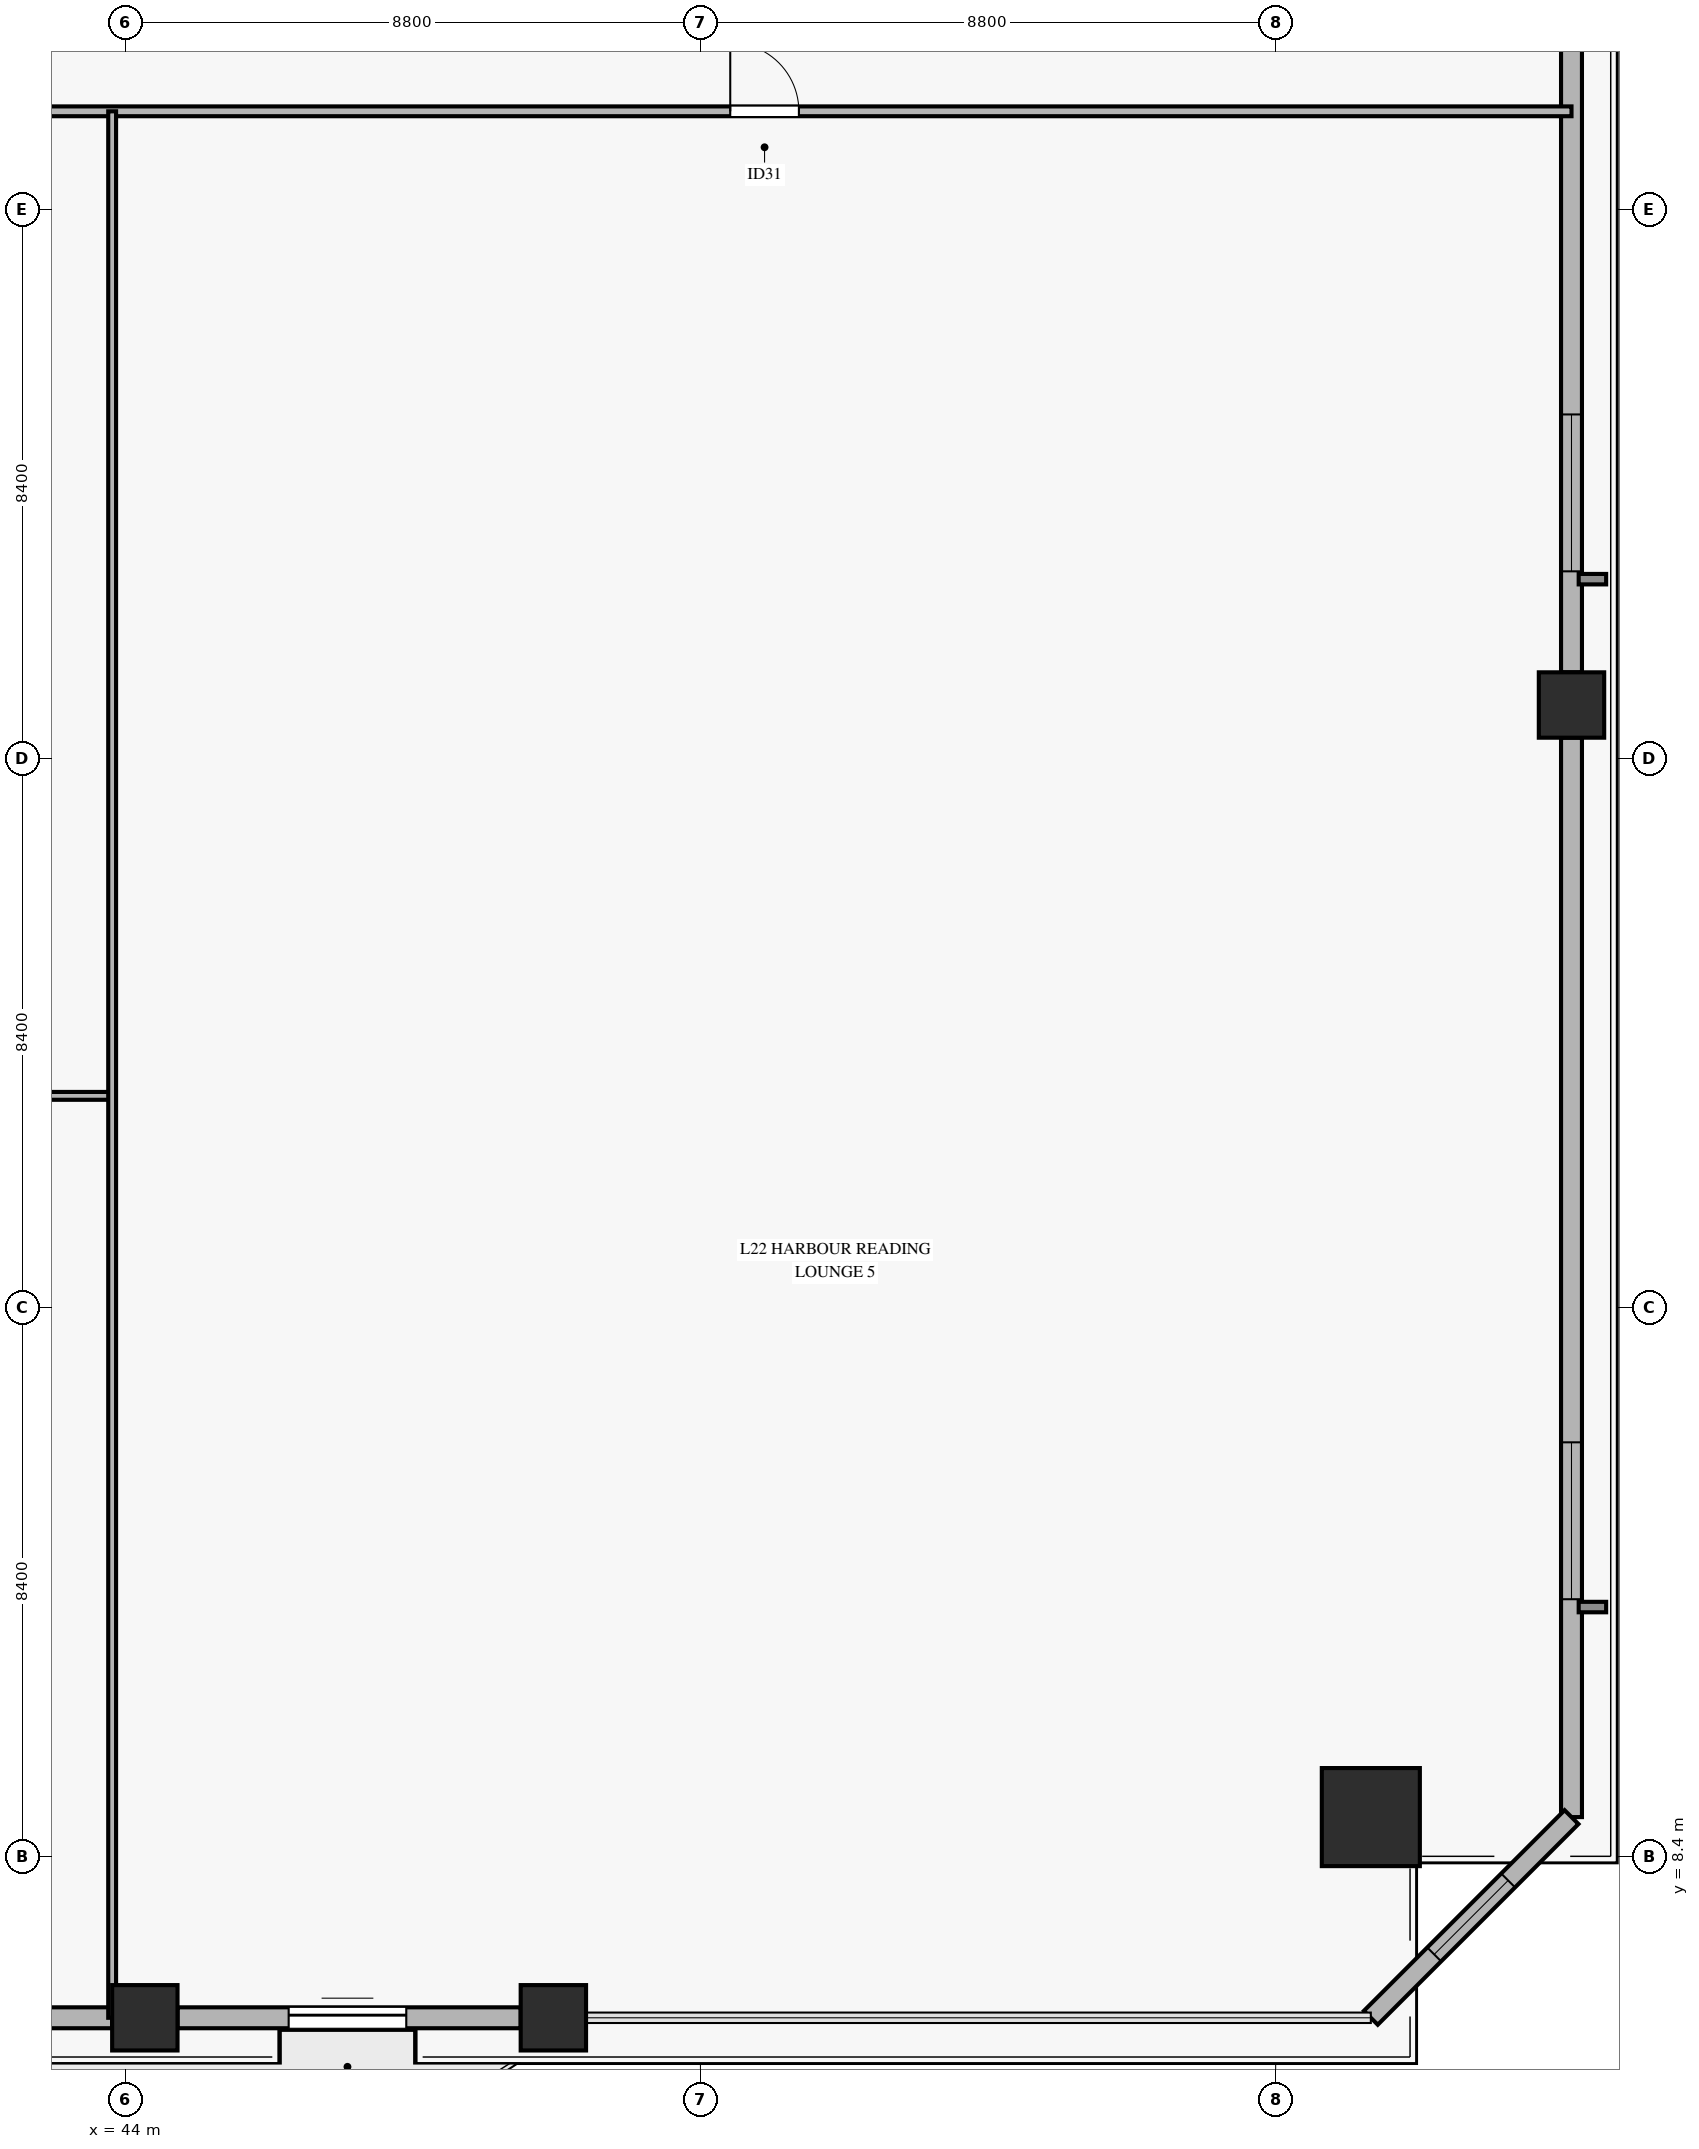
"""IFC4 building model, lengths in metres.
Left out: names, types, materials, properties, quantities, classifications, styles, units other than length and angle.
Written with IfcOpenShell. Run it as: python <this file> out.ifc"""

import sys

from ifc_helpers import new_model, si_unit, direction, frame, frame_2d, origin, origin_2d, place, context, subcontext, project, spatial, rectangle, hollow_rectangle, extrude, source, transform, mapped, element, fill, save


model = new_model("IFC4")
c1 = context("Model", 3, precision=1e-05, world=origin(), true_north=direction((0.0, 1.0)))
c2 = subcontext(c1, "Body", "Model", "MODEL_VIEW")
j1 = project(units=[si_unit("LENGTHUNIT", "METRE"), si_unit("PLANEANGLEUNIT", "RADIAN")], contexts=[c1])
p1 = place(None, origin())
s1 = spatial("IfcSite", under=j1, at=p1, CompositionType="ELEMENT")
p2 = place(p1, origin())
s2 = spatial("IfcBuilding", under=s1, at=p2, CompositionType="ELEMENT")
p3 = place(p2, frame((0.0, 0.0, 91.3)))
s3 = spatial("IfcBuildingStorey", under=s2, at=p3, CompositionType="ELEMENT", Elevation=91.3)
m1 = source(origin(), c2, "Body", "SweptSolid", [
    extrude(hollow_rectangle(XDim=1.5, YDim=1.5, WallThickness=0.07, at=origin_2d()), origin(), (0.0, 0.0, 1.0), 3.62),
])
p4 = place(p3, frame((63.056, 9.006, 0.0), z_axis=(0.0, 0.0, 1.0), x_axis=(1.0, 0.0, 0.0)))
e1 = element("IfcColumn", 1, at=p4, inside=s3, PredefinedType="COLUMN", context=c2, shape_type="MappedRepresentation", body=[
    mapped(m1, transform((0.0, 0.0, 0.0), x_axis=(1.0, 0.0, 0.0), y_axis=(0.0, 1.0, 0.0), z_axis=(0.0, 0.0, 1.0), scale=1.0)),
])
m2 = source(origin(), c2, "Body", "SweptSolid", [
    extrude(hollow_rectangle(XDim=1.0, YDim=1.0, WallThickness=0.045, at=origin_2d()), origin(), (0.0, 0.0, 1.0), 3.62),
])
for number, where, z_axis, x_axis in (
    (2, (44.3, 5.936, 0.0), (0.0, 0.0, 1.0), (1.0, 0.0, 0.0)),
    (3, (50.55, 5.936, 0.0), (0.0, 0.0, 1.0), (1.0, 0.0, 0.0)),
    (4, (66.126, 26.018, 0.0), (0.0, 0.0, 1.0), (1.0, 0.0, 0.0)),
):
    element("IfcColumn", number, at=place(p3, frame(where, z_axis=z_axis, x_axis=x_axis)), inside=s3, PredefinedType="COLUMN", context=c2, shape_type="MappedRepresentation", body=[
        mapped(m2, transform((0.0, 0.0, 0.0), x_axis=(1.0, 0.0, 0.0), y_axis=(0.0, 1.0, 0.0), z_axis=(0.0, 0.0, 1.0), scale=1.0)),
    ])
p5 = place(p3, frame((38.05, 5.936, 0.0), z_axis=(0.0, 0.0, 1.0), x_axis=(1.0, 0.0, 0.0)))
e5 = element("IfcWall", 5, at=p5, inside=s3, PredefinedType="SOLIDWALL", context=c2, shape_type="SweptSolid", body=[
    extrude(rectangle(XDim=5.75, YDim=0.32, at=frame_2d((2.875, 0.0))), origin(), (0.0, 0.0, 1.0), 3.1),
])
p6 = place(p3, frame((44.8, 5.936, 0.0), z_axis=(0.0, 0.0, 1.0), x_axis=(1.0, 0.0, 0.0)))
e6 = element("IfcWall", 6, at=p6, inside=s3, PredefinedType="SOLIDWALL", context=c2, shape_type="SweptSolid", body=[
    extrude(rectangle(XDim=5.25, YDim=0.32, at=frame_2d((2.625, 0.0))), origin(), (0.0, 0.0, 1.0), 3.1),
])
p7 = place(p6, frame((1.7, 0.0, 0.0)))
e7 = element("IfcOpeningElement", 7, at=p7, cuts=e6, PredefinedType="OPENING", context=c2, shape_type="SweptSolid", body=[
    extrude(rectangle(XDim=1.8, YDim=2.25, at=frame_2d((0.9, 1.125))), frame((0.0, 0.17, 0.0), z_axis=(0.0, -1.0, 0.0), x_axis=(1.0, 0.0, 0.0)), (0.0, 0.0, 1.0), 0.34),
])
p8 = place(p3, frame((66.126, 9.006, 0.0), z_axis=(0.0, 0.0, 1.0), x_axis=(0.0, 1.0, 0.0)))
e8 = element("IfcWall", 8, at=p8, inside=s3, PredefinedType="SOLIDWALL", context=c2, shape_type="SweptSolid", body=[
    extrude(rectangle(XDim=16.512, YDim=0.32, at=frame_2d((8.256, 0.0))), origin(), (0.0, 0.0, 1.0), 3.1),
])
p9 = place(p8, frame((3.333, 0.0, 0.45)))
e9 = element("IfcOpeningElement", 9, at=p9, cuts=e8, PredefinedType="OPENING", context=c2, shape_type="SweptSolid", body=[
    extrude(rectangle(XDim=2.4, YDim=2.1, at=frame_2d((1.2, 1.05))), frame((0.0, 0.17, 0.0), z_axis=(0.0, -1.0, 0.0), x_axis=(1.0, 0.0, 0.0)), (0.0, 0.0, 1.0), 0.34),
])
p10 = place(p3, frame((66.126, 26.518, 0.0), z_axis=(0.0, 0.0, 1.0), x_axis=(0.0, 1.0, 0.0)))
e10 = element("IfcWall", 10, at=p10, inside=s3, PredefinedType="SOLIDWALL", context=c2, shape_type="SweptSolid", body=[
    extrude(rectangle(XDim=16.512, YDim=0.32, at=frame_2d((8.256, 0.0))), origin(), (0.0, 0.0, 1.0), 3.1),
])
p11 = place(p10, frame((1.545, 0.0, 0.45)))
e11 = element("IfcOpeningElement", 11, at=p11, cuts=e10, PredefinedType="OPENING", context=c2, shape_type="SweptSolid", body=[
    extrude(rectangle(XDim=2.4, YDim=2.1, at=frame_2d((1.2, 1.05))), frame((0.0, 0.17, 0.0), z_axis=(0.0, -1.0, 0.0), x_axis=(1.0, 0.0, 0.0)), (0.0, 0.0, 1.0), 0.34),
])
p12 = place(p10, frame((12.856, 0.0, 0.45)))
e12 = element("IfcOpeningElement", 12, at=p12, cuts=e10, PredefinedType="OPENING", context=c2, shape_type="SweptSolid", body=[
    extrude(rectangle(XDim=2.4, YDim=2.1, at=frame_2d((1.2, 1.05))), frame((0.0, 0.17, 0.0), z_axis=(0.0, -1.0, 0.0), x_axis=(1.0, 0.0, 0.0)), (0.0, 0.0, 1.0), 0.34),
])
p13 = place(p3, frame((63.056, 5.936, 0.0), z_axis=(0.0, 0.0, 1.0), x_axis=(0.707106781187, 0.707106781187, 0.0)))
e13 = element("IfcWall", 13, at=p13, inside=s3, PredefinedType="SOLIDWALL", context=c2, shape_type="SweptSolid", body=[
    extrude(rectangle(XDim=4.342, YDim=0.3, at=frame_2d((2.171, 0.0))), origin(), (0.0, 0.0, 1.0), 3.1),
])
p14 = place(p13, frame((1.371, 0.0, 0.45)))
e14 = element("IfcOpeningElement", 14, at=p14, cuts=e13, PredefinedType="OPENING", context=c2, shape_type="SweptSolid", body=[
    extrude(rectangle(XDim=1.6, YDim=2.0, at=frame_2d((0.8, 1.0))), frame((0.0, 0.16, 0.0), z_axis=(0.0, -1.0, 0.0), x_axis=(1.0, 0.0, 0.0)), (0.0, 0.0, 1.0), 0.32),
])
p15 = place(p3, frame((4.275, 35.1, 0.0), z_axis=(0.0, 0.0, 1.0), x_axis=(1.0, 0.0, 0.0)))
e15 = element("IfcWall", 15, at=p15, inside=s3, PredefinedType="PARTITIONING", context=c2, shape_type="SweptSolid", body=[
    extrude(rectangle(XDim=61.851, YDim=0.15, at=frame_2d((30.926, 0.0))), origin(), (0.0, 0.0, 1.0), 2.705),
])
p16 = place(p15, frame((8.227, 0.0, 0.0)))
e16 = element("IfcOpeningElement", 16, at=p16, cuts=e15, PredefinedType="OPENING", context=c2, shape_type="SweptSolid", body=[
    extrude(rectangle(XDim=1.05, YDim=2.15, at=frame_2d((0.525, 1.075))), frame((0.0, 0.085, 0.0), z_axis=(0.0, -1.0, 0.0), x_axis=(1.0, 0.0, 0.0)), (0.0, 0.0, 1.0), 0.17),
])
p17 = place(p15, frame((21.731, 0.0, 0.0)))
e17 = element("IfcOpeningElement", 17, at=p17, cuts=e15, PredefinedType="OPENING", context=c2, shape_type="SweptSolid", body=[
    extrude(rectangle(XDim=1.05, YDim=2.15, at=frame_2d((0.525, 1.075))), frame((0.0, 0.085, 0.0), z_axis=(0.0, -1.0, 0.0), x_axis=(1.0, 0.0, 0.0)), (0.0, 0.0, 1.0), 0.17),
])
p18 = place(p15, frame((28.411, 0.0, 0.0)))
e18 = element("IfcOpeningElement", 18, at=p18, cuts=e15, PredefinedType="OPENING", context=c2, shape_type="SweptSolid", body=[
    extrude(rectangle(XDim=1.05, YDim=2.15, at=frame_2d((0.525, 1.075))), frame((0.0, 0.085, 0.0), z_axis=(0.0, -1.0, 0.0), x_axis=(1.0, 0.0, 0.0)), (0.0, 0.0, 1.0), 0.17),
])
p19 = place(p15, frame((35.371, 0.0, 0.0)))
e19 = element("IfcOpeningElement", 19, at=p19, cuts=e15, PredefinedType="OPENING", context=c2, shape_type="SweptSolid", body=[
    extrude(rectangle(XDim=1.05, YDim=2.15, at=frame_2d((0.525, 1.075))), frame((0.0, 0.085, 0.0), z_axis=(0.0, -1.0, 0.0), x_axis=(1.0, 0.0, 0.0)), (0.0, 0.0, 1.0), 0.17),
])
p20 = place(p15, frame((48.981, 0.0, 0.0)))
e20 = element("IfcOpeningElement", 20, at=p20, cuts=e15, PredefinedType="OPENING", context=c2, shape_type="SweptSolid", body=[
    extrude(rectangle(XDim=1.05, YDim=2.15, at=frame_2d((0.525, 1.075))), frame((0.0, 0.085, 0.0), z_axis=(0.0, -1.0, 0.0), x_axis=(1.0, 0.0, 0.0)), (0.0, 0.0, 1.0), 0.17),
])
p21 = place(p3, frame((36.6, 20.039, 0.0), z_axis=(0.0, 0.0, 1.0), x_axis=(1.0, 0.0, 0.0)))
e21 = element("IfcWall", 21, at=p21, inside=s3, PredefinedType="PARTITIONING", context=c2, shape_type="SweptSolid", body=[
    extrude(rectangle(XDim=7.2, YDim=0.12, at=frame_2d((3.6, 0.0))), origin(), (0.0, 0.0, 1.0), 2.705),
])
p22 = place(p21, frame((3.187, 0.0, 0.0)))
e22 = element("IfcOpeningElement", 22, at=p22, cuts=e21, PredefinedType="OPENING", context=c2, shape_type="SweptSolid", body=[
    extrude(rectangle(XDim=0.95, YDim=2.1, at=frame_2d((0.475, 1.05))), frame((0.0, 0.07, 0.0), z_axis=(0.0, -1.0, 0.0), x_axis=(1.0, 0.0, 0.0)), (0.0, 0.0, 1.0), 0.14),
])
p23 = place(p3, frame((43.8, 5.936, 0.0), z_axis=(0.0, 0.0, 1.0), x_axis=(0.0, 1.0, 0.0)))
e23 = element("IfcWall", 23, at=p23, inside=s3, PredefinedType="PARTITIONING", context=c2, shape_type="SweptSolid", body=[
    extrude(rectangle(XDim=29.164, YDim=0.12, at=frame_2d((14.582, 0.0))), origin(), (0.0, 0.0, 1.0), 3.155),
])
m3 = source(origin(), c2, "Body", "SweptSolid", [
    extrude(rectangle(XDim=1.8, YDim=2.25, at=frame_2d((0.9, 1.125))), frame((0.0, 0.025, 0.0), z_axis=(0.0, -1.0, 0.0), x_axis=(1.0, 0.0, 0.0)), (0.0, 0.0, 1.0), 0.05),
])
p24 = place(p7, origin())
e24 = element("IfcDoor", 24, at=p24, inside=s3, OperationType="SLIDING_TO_LEFT", PredefinedType="DOOR", context=c2, shape_type="MappedRepresentation", body=[
    mapped(m3, transform((0.0, 0.0, 0.0), x_axis=(1.0, 0.0, 0.0), y_axis=(0.0, 1.0, 0.0), z_axis=(0.0, 0.0, 1.0), scale=1.0)),
])
fill(e7, e24)
m4 = source(origin(), c2, "Body", "SweptSolid", [
    extrude(rectangle(XDim=2.4, YDim=2.1, at=frame_2d((1.2, 1.05))), frame((0.0, 0.03, 0.0), z_axis=(0.0, -1.0, 0.0), x_axis=(1.0, 0.0, 0.0)), (0.0, 0.0, 1.0), 0.06),
])
p25 = place(p9, origin())
e25 = element("IfcWindow", 25, at=p25, inside=s3, PartitioningType="SINGLE_PANEL", PredefinedType="WINDOW", context=c2, shape_type="MappedRepresentation", body=[
    mapped(m4, transform((0.0, 0.0, 0.0), x_axis=(1.0, 0.0, 0.0), y_axis=(0.0, 1.0, 0.0), z_axis=(0.0, 0.0, 1.0), scale=1.0)),
])
fill(e9, e25)
p26 = place(p11, origin())
e26 = element("IfcWindow", 26, at=p26, inside=s3, PartitioningType="SINGLE_PANEL", PredefinedType="WINDOW", context=c2, shape_type="MappedRepresentation", body=[
    mapped(m4, transform((0.0, 0.0, 0.0), x_axis=(1.0, 0.0, 0.0), y_axis=(0.0, 1.0, 0.0), z_axis=(0.0, 0.0, 1.0), scale=1.0)),
])
fill(e11, e26)
m5 = source(origin(), c2, "Body", "SweptSolid", [
    extrude(rectangle(XDim=1.6, YDim=2.0, at=frame_2d((0.8, 1.0))), frame((0.0, 0.03, 0.0), z_axis=(0.0, -1.0, 0.0), x_axis=(1.0, 0.0, 0.0)), (0.0, 0.0, 1.0), 0.06),
])
p27 = place(p14, origin())
e27 = element("IfcWindow", 27, at=p27, inside=s3, PartitioningType="SINGLE_PANEL", PredefinedType="WINDOW", context=c2, shape_type="MappedRepresentation", body=[
    mapped(m5, transform((0.0, 0.0, 0.0), x_axis=(1.0, 0.0, 0.0), y_axis=(0.0, 1.0, 0.0), z_axis=(0.0, 0.0, 1.0), scale=1.0)),
])
fill(e14, e27)
m6 = source(origin(), c2, "Body", "SweptSolid", [
    extrude(rectangle(XDim=1.05, YDim=2.15, at=frame_2d((0.525, 1.075))), frame((0.0, 0.025, 0.0), z_axis=(0.0, -1.0, 0.0), x_axis=(1.0, 0.0, 0.0)), (0.0, 0.0, 1.0), 0.05),
])
p28 = place(p20, origin())
e28 = element("IfcDoor", 28, at=p28, inside=s3, OperationType="SINGLE_SWING_LEFT", PredefinedType="DOOR", context=c2, shape_type="MappedRepresentation", body=[
    mapped(m6, transform((0.0, 0.0, 0.0), x_axis=(1.0, 0.0, 0.0), y_axis=(0.0, 1.0, 0.0), z_axis=(0.0, 0.0, 1.0), scale=1.0)),
])
fill(e20, e28)
save(model, sys.argv[1])
